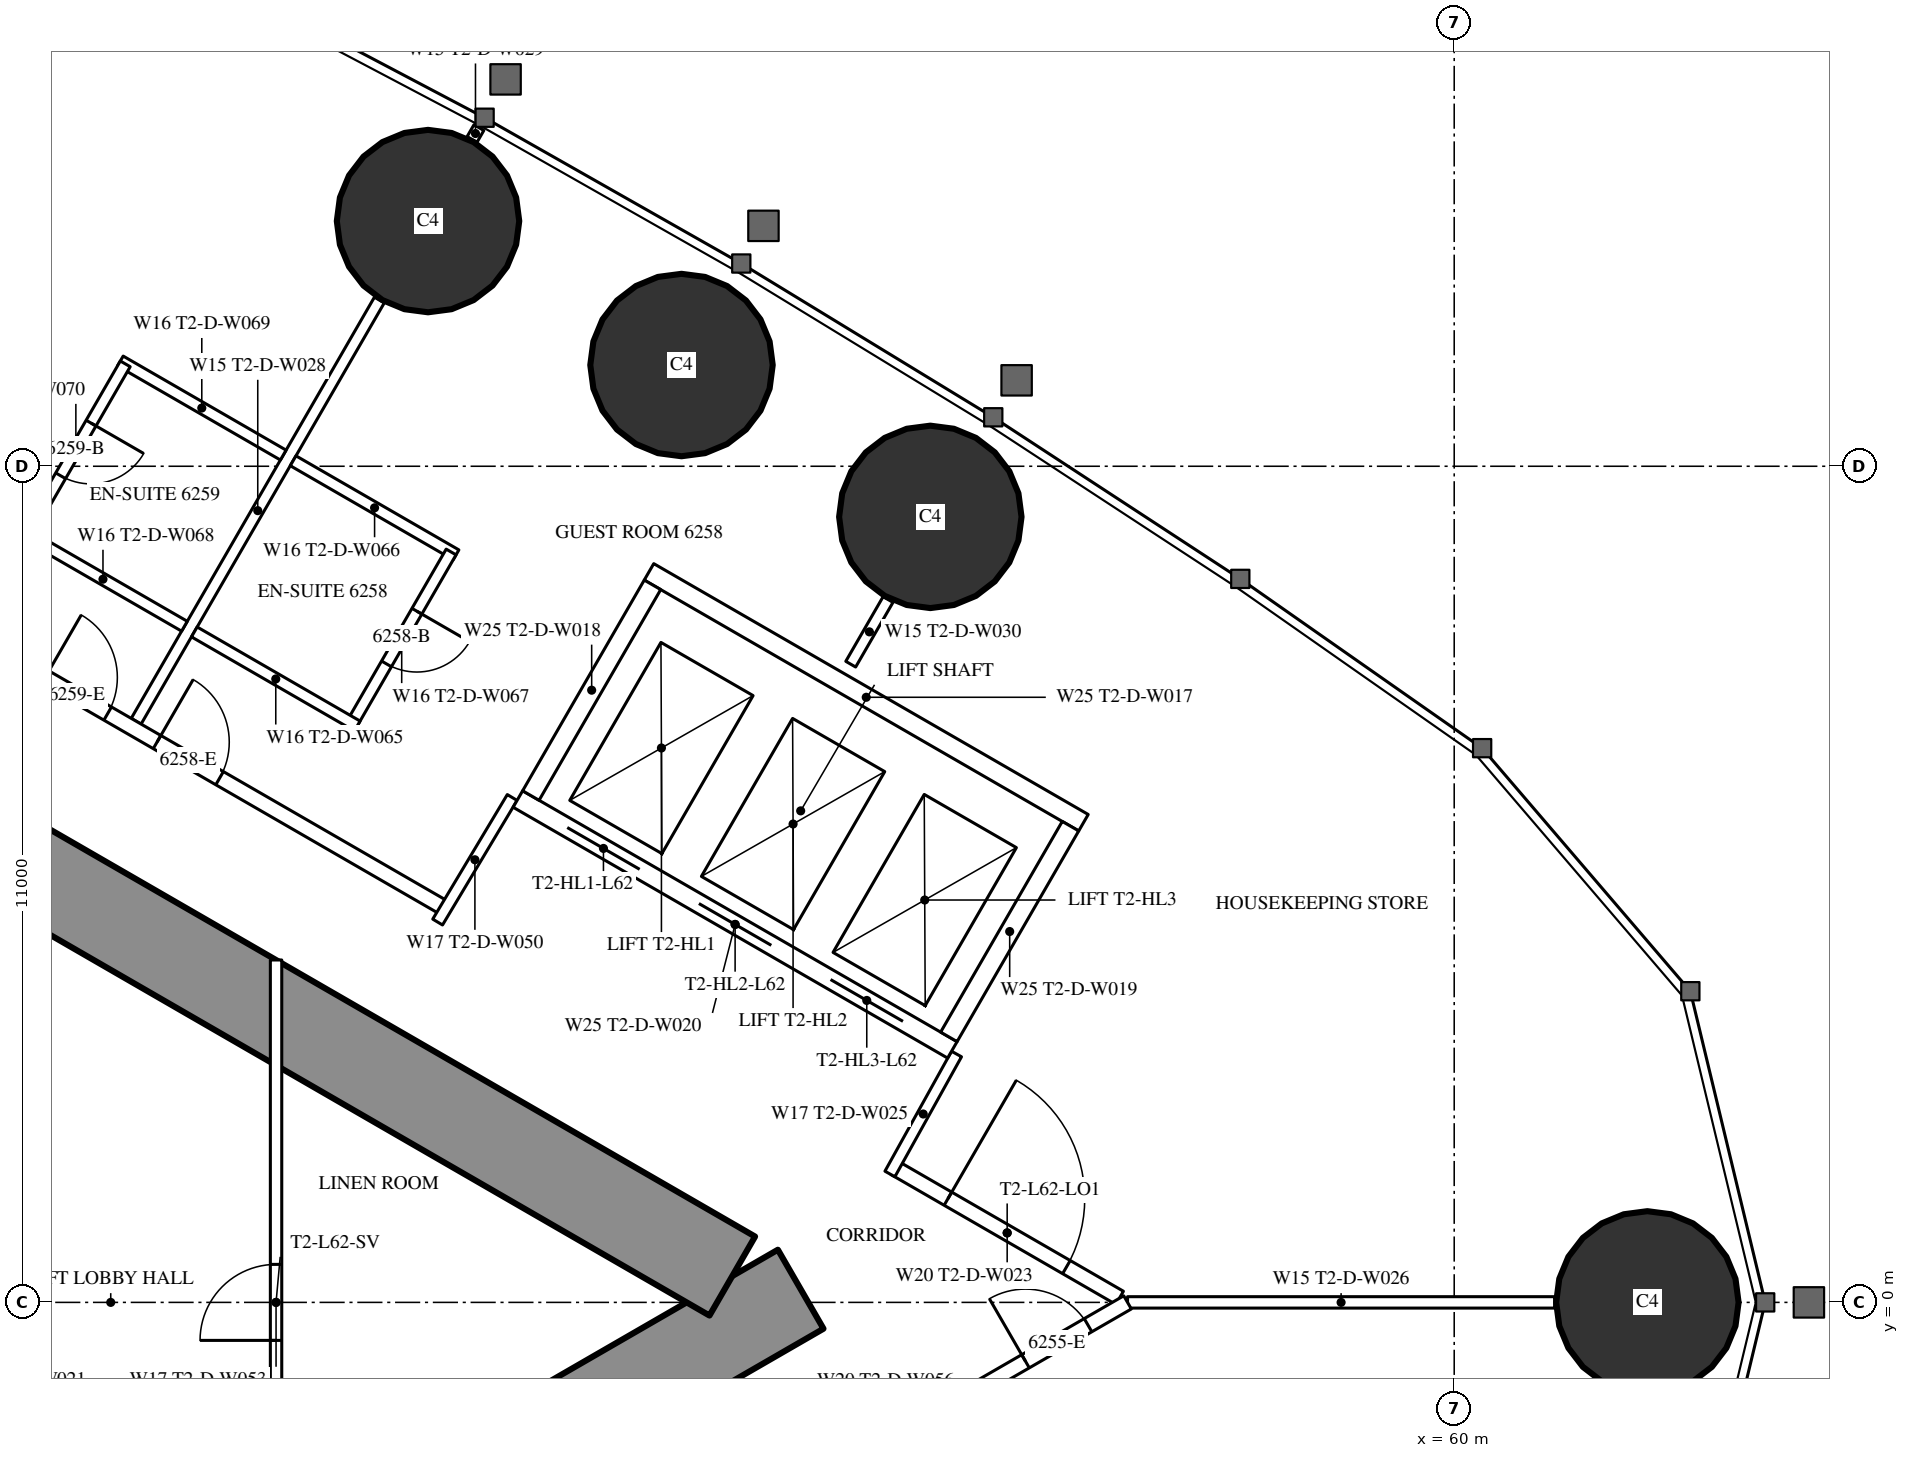
"""IFC4 building model, lengths in metres.
Left out: names, types, materials, properties, quantities, classifications, styles, units other than length and angle.
Written with IfcOpenShell. Run it as: python <this file> out.ifc"""

import sys

from ifc_helpers import new_model, si_unit, direction, frame, frame_2d, origin, origin_2d, place, context, subcontext, project, spatial, rectangle, circle, extrude, element, fill, save


model = new_model("IFC4")
c1 = context("Model", 3, precision=1e-05, world=origin(), true_north=direction((0.0, 1.0)))
c2 = subcontext(c1, "Body", "Model", "MODEL_VIEW")
j1 = project(units=[si_unit("LENGTHUNIT", "METRE"), si_unit("PLANEANGLEUNIT", "RADIAN")], contexts=[c1])
p1 = place(None, origin())
s1 = spatial("IfcSite", under=j1, at=p1, CompositionType="ELEMENT")
p2 = place(p1, origin())
s2 = spatial("IfcBuilding", under=s1, at=p2, CompositionType="ELEMENT")
p3 = place(p2, frame((0.0, 0.0, 233.3)))
s3 = spatial("IfcBuildingStorey", under=s2, at=p3, CompositionType="ELEMENT", Elevation=233.3)
for number, where, z_axis, x_axis in (
    (1, (62.542, 0.0, 0.0), (0.0, 0.0, 1.0), (1.0, 0.0, 0.0)),
    (2, (53.108, 10.334, 0.0), (0.0, 0.0, 1.0), (1.0, 0.0, 0.0)),
    (3, (49.834, 12.332, 0.0), (0.0, 0.0, 1.0), (1.0, 0.0, 0.0)),
    (4, (46.499, 14.226, 0.0), (0.0, 0.0, 1.0), (1.0, 0.0, 0.0)),
):
    element("IfcColumn", number, at=place(p3, frame(where, z_axis=z_axis, x_axis=x_axis)), inside=s3, PredefinedType="COLUMN", context=c2, shape_type="SweptSolid", body=[
        extrude(circle(Radius=1.2, at=origin_2d()), origin(), (0.0, 0.0, 1.0), 3.6),
    ])
p4 = place(p3, frame((27.2, -13.8, 0.0), z_axis=(0.0, 0.0, 1.0), x_axis=(0.866027159892, 0.499996958321, 0.0)))
e5 = element("IfcWall", 5, at=p4, inside=s3, PredefinedType="SHEAR", context=c2, shape_type="SweptSolid", body=[
    extrude(rectangle(XDim=27.947, YDim=1.2, at=frame_2d((13.973, 0.0))), origin(), (0.0, 0.0, 1.0), 3.6),
])
p5 = place(p4, frame((4.6, 0.0, 0.0)))
e6 = element("IfcOpeningElement", 6, at=p5, cuts=e5, PredefinedType="OPENING", context=c2, shape_type="SweptSolid", body=[
    extrude(rectangle(XDim=1.0, YDim=2.2, at=frame_2d((0.5, 1.1))), frame((0.0, 0.61, 0.0), z_axis=(0.0, -1.0, 0.0), x_axis=(1.0, 0.0, 0.0)), (0.0, 0.0, 1.0), 1.22),
])
p6 = place(p4, frame((13.395, 0.0, 0.0)))
e7 = element("IfcOpeningElement", 7, at=p6, cuts=e5, PredefinedType="OPENING", context=c2, shape_type="SweptSolid", body=[
    extrude(rectangle(XDim=1.8, YDim=2.2, at=frame_2d((0.9, 1.1))), frame((0.0, 0.61, 0.0), z_axis=(0.0, -1.0, 0.0), x_axis=(1.0, 0.0, 0.0)), (0.0, 0.0, 1.0), 1.22),
])
p7 = place(p3, frame((27.2, 13.8, 0.0), z_axis=(0.0, 0.0, 1.0), x_axis=(0.866024515034, -0.500001539357, 0.0)))
e8 = element("IfcWall", 8, at=p7, inside=s3, PredefinedType="SHEAR", context=c2, shape_type="SweptSolid", body=[
    extrude(rectangle(XDim=26.907, YDim=1.2, at=frame_2d((13.454, 0.0))), origin(), (0.0, 0.0, 1.0), 3.6),
])
p8 = place(p7, frame((4.6, 0.0, 0.0)))
e9 = element("IfcOpeningElement", 9, at=p8, cuts=e8, PredefinedType="OPENING", context=c2, shape_type="SweptSolid", body=[
    extrude(rectangle(XDim=1.0, YDim=2.2, at=frame_2d((0.5, 1.1))), frame((0.0, 0.61, 0.0), z_axis=(0.0, -1.0, 0.0), x_axis=(1.0, 0.0, 0.0)), (0.0, 0.0, 1.0), 1.22),
])
p9 = place(p7, frame((13.395, 0.0, 0.0)))
e10 = element("IfcOpeningElement", 10, at=p9, cuts=e8, PredefinedType="OPENING", context=c2, shape_type="SweptSolid", body=[
    extrude(rectangle(XDim=1.8, YDim=2.2, at=frame_2d((0.9, 1.1))), frame((0.0, 0.61, 0.0), z_axis=(0.0, -1.0, 0.0), x_axis=(1.0, 0.0, 0.0)), (0.0, 0.0, 1.0), 1.22),
])
p10 = place(p3, frame((42.66, 7.646, 0.0), z_axis=(0.0, 0.0, 1.0), x_axis=(0.499996592859, 0.866027370889, 0.0)))
e11 = element("IfcWall", 11, at=p10, inside=s3, PredefinedType="PARTITIONING", context=c2, shape_type="SweptSolid", body=[
    extrude(rectangle(XDim=6.398, YDim=0.15, at=frame_2d((3.199, 0.0))), origin(), (0.0, 0.0, 1.0), 2.45),
])
p11 = place(p3, frame((47.079, 15.3, 0.0), z_axis=(0.0, 0.0, 1.0), x_axis=(0.499212083968, 0.866479829667, 0.0)))
e12 = element("IfcWall", 12, at=p11, inside=s3, PredefinedType="PARTITIONING", context=c2, shape_type="SweptSolid", body=[
    extrude(rectangle(XDim=0.179, YDim=0.15, at=frame_2d((0.09, 0.0))), origin(), (0.0, 0.0, 1.0), 2.45),
])
p12 = place(p3, frame((55.702, 0.0, 0.0), z_axis=(0.0, 0.0, 1.0), x_axis=(1.0, 0.0, 0.0)))
e13 = element("IfcWall", 13, at=p12, inside=s3, PredefinedType="PARTITIONING", context=c2, shape_type="SweptSolid", body=[
    extrude(rectangle(XDim=5.619, YDim=0.15, at=frame_2d((2.81, 0.0))), origin(), (0.0, 0.0, 1.0), 2.45),
])
p13 = place(p3, frame((52.06, 8.396, 0.0), z_axis=(0.0, 0.0, 1.0), x_axis=(0.500095379624, 0.865970329329, 0.0)))
e14 = element("IfcWall", 14, at=p13, inside=s3, PredefinedType="PARTITIONING", context=c2, shape_type="SweptSolid", body=[
    extrude(rectangle(XDim=0.982, YDim=0.15, at=frame_2d((0.491, 0.0))), origin(), (0.0, 0.0, 1.0), 3.35),
])
p14 = place(p3, frame((28.959, 15.44, 0.0), z_axis=(0.0, 0.0, 1.0), x_axis=(0.866028936079, -0.499993881836, 0.0)))
e15 = element("IfcWall", 15, at=p14, inside=s3, PredefinedType="PARTITIONING", context=c2, shape_type="SweptSolid", body=[
    extrude(rectangle(XDim=20.503, YDim=0.2, at=frame_2d((10.251, 0.0))), origin(), (0.0, 0.0, 1.0), 3.35),
])
p15 = place(p14, frame((16.137, 0.0, 0.0)))
e16 = element("IfcOpeningElement", 16, at=p15, cuts=e15, PredefinedType="OPENING", context=c2, shape_type="SweptSolid", body=[
    extrude(rectangle(XDim=0.95, YDim=2.2, at=frame_2d((0.475, 1.1))), frame((0.0, 0.11, 0.0), z_axis=(0.0, -1.0, 0.0), x_axis=(1.0, 0.0, 0.0)), (0.0, 0.0, 1.0), 0.22),
])
p16 = place(p14, frame((14.437, 0.0, 0.0)))
e17 = element("IfcOpeningElement", 17, at=p16, cuts=e15, PredefinedType="OPENING", context=c2, shape_type="SweptSolid", body=[
    extrude(rectangle(XDim=0.95, YDim=2.2, at=frame_2d((0.475, 1.1))), frame((0.0, 0.11, 0.0), z_axis=(0.0, -1.0, 0.0), x_axis=(1.0, 0.0, 0.0)), (0.0, 0.0, 1.0), 0.22),
])
p17 = place(p14, frame((2.244, 0.0, 0.0)))
e18 = element("IfcOpeningElement", 18, at=p17, cuts=e15, PredefinedType="OPENING", context=c2, shape_type="SweptSolid", body=[
    extrude(rectangle(XDim=1.8, YDim=2.03, at=frame_2d((0.9, 1.015))), frame((0.0, 0.11, 0.0), z_axis=(0.0, -1.0, 0.0), x_axis=(1.0, 0.0, 0.0)), (0.0, 0.0, 1.0), 0.22),
])
p18 = place(p3, frame((52.639, 1.769, 0.0), z_axis=(0.0, 0.0, 1.0), x_axis=(0.866027340901, -0.4999966448, 0.0)))
e19 = element("IfcWall", 19, at=p18, inside=s3, PredefinedType="PARTITIONING", context=c2, shape_type="SweptSolid", body=[
    extrude(rectangle(XDim=3.417, YDim=0.2, at=frame_2d((1.708, 0.0))), origin(), (0.0, 0.0, 1.0), 3.35),
])
p19 = place(p18, frame((0.809, 0.0, 0.0)))
e20 = element("IfcOpeningElement", 20, at=p19, cuts=e19, PredefinedType="OPENING", context=c2, shape_type="SweptSolid", body=[
    extrude(rectangle(XDim=1.8, YDim=2.2, at=frame_2d((0.9, 1.1))), frame((0.0, 0.11, 0.0), z_axis=(0.0, -1.0, 0.0), x_axis=(1.0, 0.0, 0.0)), (0.0, 0.0, 1.0), 0.22),
])
p20 = place(p3, frame((47.606, 6.642, 0.0), z_axis=(0.0, 0.0, 1.0), x_axis=(-0.51353662755, -0.858067673418, 0.0)))
e21 = element("IfcWall", 21, at=p20, inside=s3, PredefinedType="PARTITIONING", context=c2, shape_type="SweptSolid", body=[
    extrude(rectangle(XDim=1.91, YDim=0.15, at=frame_2d((0.955, 0.0))), origin(), (0.0, 0.0, 1.0), 3.35),
])
p21 = place(p3, frame((52.576, 1.689, 0.0), z_axis=(0.0, 0.0, 1.0), x_axis=(0.485424724123, 0.874278466629, 0.0)))
e22 = element("IfcWall", 22, at=p21, inside=s3, PredefinedType="PARTITIONING", context=c2, shape_type="SweptSolid", body=[
    extrude(rectangle(XDim=1.805, YDim=0.15, at=frame_2d((0.903, 0.0))), origin(), (0.0, 0.0, 1.0), 3.35),
])
p22 = place(p3, frame((44.725, 11.072, 0.0), z_axis=(0.0, 0.0, 1.0), x_axis=(0.866006523861, -0.500032699561, 0.0)))
e23 = element("IfcWall", 23, at=p22, inside=s3, PredefinedType="PARTITIONING", context=c2, shape_type="SweptSolid", body=[
    extrude(rectangle(XDim=2.475, YDim=0.15, at=frame_2d((1.237, 0.0))), origin(), (0.0, 0.0, 1.0), 3.35),
])
p23 = place(p3, frame((45.503, 7.621, 0.0), z_axis=(0.0, 0.0, 1.0), x_axis=(0.500006934395, 0.866021400173, 0.0)))
e24 = element("IfcWall", 24, at=p23, inside=s3, PredefinedType="PARTITIONING", context=c2, shape_type="SweptSolid", body=[
    extrude(rectangle(XDim=2.6, YDim=0.15, at=frame_2d((1.3, 0.0))), origin(), (0.0, 0.0, 1.0), 3.35),
])
p24 = place(p23, frame((0.9, 0.0, 0.0)))
e25 = element("IfcOpeningElement", 25, at=p24, cuts=e24, PredefinedType="OPENING", context=c2, shape_type="SweptSolid", body=[
    extrude(rectangle(XDim=0.8, YDim=2.2, at=frame_2d((0.4, 1.1))), frame((0.0, 0.085, 0.0), z_axis=(0.0, -1.0, 0.0), x_axis=(1.0, 0.0, 0.0)), (0.0, 0.0, 1.0), 0.17),
])
p25 = place(p3, frame((43.425, 8.821, 0.0), z_axis=(0.0, 0.0, 1.0), x_axis=(0.866006523861, -0.500032699561, 0.0)))
e26 = element("IfcWall", 26, at=p25, inside=s3, PredefinedType="PARTITIONING", context=c2, shape_type="SweptSolid", body=[
    extrude(rectangle(XDim=2.475, YDim=0.15, at=frame_2d((1.237, 0.0))), origin(), (0.0, 0.0, 1.0), 2.5),
])
p26 = place(p3, frame((42.451, 12.385, 0.0), z_axis=(0.0, 0.0, 1.0), x_axis=(0.866031185235, -0.4999899861, 0.0)))
e27 = element("IfcWall", 27, at=p26, inside=s3, PredefinedType="PARTITIONING", context=c2, shape_type="SweptSolid", body=[
    extrude(rectangle(XDim=2.475, YDim=0.15, at=frame_2d((1.238, 0.0))), origin(), (0.0, 0.0, 1.0), 3.35),
])
p27 = place(p3, frame((41.216, 10.095, 0.0), z_axis=(0.0, 0.0, 1.0), x_axis=(0.499936506574, 0.866062058628, 0.0)))
e28 = element("IfcWall", 28, at=p27, inside=s3, PredefinedType="PARTITIONING", context=c2, shape_type="SweptSolid", body=[
    extrude(rectangle(XDim=2.6, YDim=0.15, at=frame_2d((1.3, 0.0))), origin(), (0.0, 0.0, 1.0), 3.35),
])
p28 = place(p27, frame((0.9, 0.0, 0.0)))
e29 = element("IfcOpeningElement", 29, at=p28, cuts=e28, PredefinedType="OPENING", context=c2, shape_type="SweptSolid", body=[
    extrude(rectangle(XDim=0.8, YDim=2.2, at=frame_2d((0.4, 1.1))), frame((0.0, 0.085, 0.0), z_axis=(0.0, -1.0, 0.0), x_axis=(1.0, 0.0, 0.0)), (0.0, 0.0, 1.0), 0.17),
])
p29 = place(p3, frame((41.151, 10.133, 0.0), z_axis=(0.0, 0.0, 1.0), x_axis=(0.866006523861, -0.500032699561, 0.0)))
e30 = element("IfcWall", 30, at=p29, inside=s3, PredefinedType="PARTITIONING", context=c2, shape_type="SweptSolid", body=[
    extrude(rectangle(XDim=2.475, YDim=0.15, at=frame_2d((1.237, 0.0))), origin(), (0.0, 0.0, 1.0), 2.5),
])
p30 = place(p3, frame((49.335, -3.676, 0.0), z_axis=(0.0, 0.0, 1.0), x_axis=(0.866021344046, 0.500007031608, 0.0)))
e31 = element("IfcWall", 31, at=p30, inside=s3, PredefinedType="PARTITIONING", context=c2, shape_type="SweptSolid", body=[
    extrude(rectangle(XDim=7.352, YDim=0.2, at=frame_2d((3.676, 0.0))), origin(), (0.0, 0.0, 1.0), 3.35),
])
p31 = place(p30, frame((5.802, 0.0, 0.0)))
e32 = element("IfcOpeningElement", 32, at=p31, cuts=e31, PredefinedType="OPENING", context=c2, shape_type="SweptSolid", body=[
    extrude(rectangle(XDim=0.95, YDim=2.2, at=frame_2d((0.475, 1.1))), frame((0.0, 0.11, 0.0), z_axis=(0.0, -1.0, 0.0), x_axis=(1.0, 0.0, 0.0)), (0.0, 0.0, 1.0), 0.22),
])
p32 = place(p3, frame((44.5, -4.505, 0.0), z_axis=(0.0, 0.0, 1.0), x_axis=(0.0, 1.0, 0.0)))
e33 = element("IfcWall", 33, at=p32, inside=s3, PredefinedType="PARTITIONING", context=c2, shape_type="SweptSolid", body=[
    extrude(rectangle(XDim=9.009, YDim=0.15, at=frame_2d((4.505, 0.0))), origin(), (0.0, 0.0, 1.0), 3.35),
])
p33 = place(p32, frame((4.005, 0.0, 0.0)))
e34 = element("IfcOpeningElement", 34, at=p33, cuts=e33, PredefinedType="OPENING", context=c2, shape_type="SweptSolid", body=[
    extrude(rectangle(XDim=1.0, YDim=2.2, at=frame_2d((0.5, 1.1))), frame((0.0, 0.085, 0.0), z_axis=(0.0, -1.0, 0.0), x_axis=(1.0, 0.0, 0.0)), (0.0, 0.0, 1.0), 0.17),
])
p34 = place(p3, frame((47.681, 6.622, 0.0), z_axis=(0.0, 0.0, 1.0), x_axis=(0.86603344179, -0.499986077507, 0.0)))
e35 = element("IfcWall", 35, at=p34, inside=s3, PredefinedType="PARTITIONING", context=c2, shape_type="SweptSolid", body=[
    extrude(rectangle(XDim=6.6, YDim=0.25, at=frame_2d((3.3, 0.0))), origin(), (0.0, 0.0, 1.0), 3.35),
])
p35 = place(p34, frame((0.75, 0.0, 0.0)))
e36 = element("IfcOpeningElement", 36, at=p35, cuts=e35, PredefinedType="OPENING", context=c2, shape_type="SweptSolid", body=[
    extrude(rectangle(XDim=1.1, YDim=2.2, at=frame_2d((0.55, 1.1))), frame((0.0, 0.135, 0.0), z_axis=(0.0, -1.0, 0.0), x_axis=(1.0, 0.0, 0.0)), (0.0, 0.0, 1.0), 0.27),
])
p36 = place(p34, frame((2.75, 0.0, 0.0)))
e37 = element("IfcOpeningElement", 37, at=p36, cuts=e35, PredefinedType="OPENING", context=c2, shape_type="SweptSolid", body=[
    extrude(rectangle(XDim=1.1, YDim=2.2, at=frame_2d((0.55, 1.1))), frame((0.0, 0.135, 0.0), z_axis=(0.0, -1.0, 0.0), x_axis=(1.0, 0.0, 0.0)), (0.0, 0.0, 1.0), 0.27),
])
p37 = place(p34, frame((4.75, 0.0, 0.0)))
e38 = element("IfcOpeningElement", 38, at=p37, cuts=e35, PredefinedType="OPENING", context=c2, shape_type="SweptSolid", body=[
    extrude(rectangle(XDim=1.1, YDim=2.2, at=frame_2d((0.55, 1.1))), frame((0.0, 0.135, 0.0), z_axis=(0.0, -1.0, 0.0), x_axis=(1.0, 0.0, 0.0)), (0.0, 0.0, 1.0), 0.27),
])
p38 = place(p3, frame((49.406, 9.611, 0.0), z_axis=(0.0, 0.0, 1.0), x_axis=(0.86603344179, -0.499986077507, 0.0)))
e39 = element("IfcWall", 39, at=p38, inside=s3, PredefinedType="PARTITIONING", context=c2, shape_type="SweptSolid", body=[
    extrude(rectangle(XDim=6.6, YDim=0.25, at=frame_2d((3.3, 0.0))), origin(), (0.0, 0.0, 1.0), 3.35),
])
p39 = place(p3, frame((47.852, 6.668, 0.0), z_axis=(0.0, 0.0, 1.0), x_axis=(0.499929347863, 0.866066190972, 0.0)))
e40 = element("IfcWall", 40, at=p39, inside=s3, PredefinedType="PARTITIONING", context=c2, shape_type="SweptSolid", body=[
    extrude(rectangle(XDim=3.201, YDim=0.25, at=frame_2d((1.6, 0.0))), origin(), (0.0, 0.0, 1.0), 3.35),
])
p40 = place(p3, frame((53.352, 3.493, 0.0), z_axis=(0.0, 0.0, 1.0), x_axis=(0.499872130319, 0.866099216793, 0.0)))
e41 = element("IfcWall", 41, at=p40, inside=s3, PredefinedType="PARTITIONING", context=c2, shape_type="SweptSolid", body=[
    extrude(rectangle(XDim=3.2, YDim=0.25, at=frame_2d((1.6, 0.0))), origin(), (0.0, 0.0, 1.0), 3.35),
])
p41 = place(p31, origin())
e42 = element("IfcDoor", 42, at=p41, inside=s3, OperationType="SINGLE_SWING_LEFT", PredefinedType="DOOR", context=c2, shape_type="SweptSolid", body=[
    extrude(rectangle(XDim=0.95, YDim=2.2, at=frame_2d((0.475, 1.1))), frame((0.0, 0.025, 0.0), z_axis=(0.0, -1.0, 0.0), x_axis=(1.0, 0.0, 0.0)), (0.0, 0.0, 1.0), 0.05),
])
fill(e32, e42)
p42 = place(p24, origin())
e43 = element("IfcDoor", 43, at=p42, inside=s3, OperationType="SINGLE_SWING_RIGHT", PredefinedType="DOOR", context=c2, shape_type="SweptSolid", body=[
    extrude(rectangle(XDim=0.8, YDim=2.2, at=frame_2d((0.4, 1.1))), frame((0.0, 0.025, 0.0), z_axis=(0.0, -1.0, 0.0), x_axis=(1.0, 0.0, 0.0)), (0.0, 0.0, 1.0), 0.05),
])
fill(e25, e43)
p43 = place(p15, origin())
e44 = element("IfcDoor", 44, at=p43, inside=s3, OperationType="SINGLE_SWING_LEFT", PredefinedType="DOOR", context=c2, shape_type="SweptSolid", body=[
    extrude(rectangle(XDim=0.95, YDim=2.2, at=frame_2d((0.475, 1.1))), frame((0.0, 0.025, 0.0), z_axis=(0.0, -1.0, 0.0), x_axis=(1.0, 0.0, 0.0)), (0.0, 0.0, 1.0), 0.05),
])
fill(e16, e44)
p44 = place(p28, origin())
e45 = element("IfcDoor", 45, at=p44, inside=s3, OperationType="SINGLE_SWING_RIGHT", PredefinedType="DOOR", context=c2, shape_type="SweptSolid", body=[
    extrude(rectangle(XDim=0.8, YDim=2.2, at=frame_2d((0.4, 1.1))), frame((0.0, 0.025, 0.0), z_axis=(0.0, -1.0, 0.0), x_axis=(1.0, 0.0, 0.0)), (0.0, 0.0, 1.0), 0.05),
])
fill(e29, e45)
p45 = place(p16, origin())
e46 = element("IfcDoor", 46, at=p45, inside=s3, OperationType="SINGLE_SWING_LEFT", PredefinedType="DOOR", context=c2, shape_type="SweptSolid", body=[
    extrude(rectangle(XDim=0.95, YDim=2.2, at=frame_2d((0.475, 1.1))), frame((0.0, 0.025, 0.0), z_axis=(0.0, -1.0, 0.0), x_axis=(1.0, 0.0, 0.0)), (0.0, 0.0, 1.0), 0.05),
])
fill(e17, e46)
p46 = place(p19, origin())
e47 = element("IfcDoor", 47, at=p46, inside=s3, OperationType="DOUBLE_DOOR_SINGLE_SWING", PredefinedType="DOOR", context=c2, shape_type="SweptSolid", body=[
    extrude(rectangle(XDim=1.8, YDim=2.2, at=frame_2d((0.9, 1.1))), frame((0.0, 0.025, 0.0), z_axis=(0.0, -1.0, 0.0), x_axis=(1.0, 0.0, 0.0)), (0.0, 0.0, 1.0), 0.05),
])
fill(e20, e47)
p47 = place(p33, origin())
e48 = element("IfcDoor", 48, at=p47, inside=s3, OperationType="SINGLE_SWING_LEFT", PredefinedType="DOOR", context=c2, shape_type="SweptSolid", body=[
    extrude(rectangle(XDim=1.0, YDim=2.2, at=frame_2d((0.5, 1.1))), frame((0.0, 0.025, 0.0), z_axis=(0.0, -1.0, 0.0), x_axis=(1.0, 0.0, 0.0)), (0.0, 0.0, 1.0), 0.05),
])
fill(e34, e48)
p48 = place(p35, origin())
e49 = element("IfcDoor", 49, at=p48, inside=s3, OperationType="DOUBLE_DOOR_SLIDING", PredefinedType="USERDEFINED", context=c2, shape_type="SweptSolid", body=[
    extrude(rectangle(XDim=1.1, YDim=2.2, at=frame_2d((0.55, 1.1))), frame((0.0, 0.025, 0.0), z_axis=(0.0, -1.0, 0.0), x_axis=(1.0, 0.0, 0.0)), (0.0, 0.0, 1.0), 0.05),
])
fill(e36, e49)
p49 = place(p36, origin())
e50 = element("IfcDoor", 50, at=p49, inside=s3, OperationType="DOUBLE_DOOR_SLIDING", PredefinedType="USERDEFINED", context=c2, shape_type="SweptSolid", body=[
    extrude(rectangle(XDim=1.1, YDim=2.2, at=frame_2d((0.55, 1.1))), frame((0.0, 0.025, 0.0), z_axis=(0.0, -1.0, 0.0), x_axis=(1.0, 0.0, 0.0)), (0.0, 0.0, 1.0), 0.05),
])
fill(e37, e50)
p50 = place(p37, origin())
e51 = element("IfcDoor", 51, at=p50, inside=s3, OperationType="DOUBLE_DOOR_SLIDING", PredefinedType="USERDEFINED", context=c2, shape_type="SweptSolid", body=[
    extrude(rectangle(XDim=1.1, YDim=2.2, at=frame_2d((0.55, 1.1))), frame((0.0, 0.025, 0.0), z_axis=(0.0, -1.0, 0.0), x_axis=(1.0, 0.0, 0.0)), (0.0, 0.0, 1.0), 0.05),
])
fill(e38, e51)
save(model, sys.argv[1])
